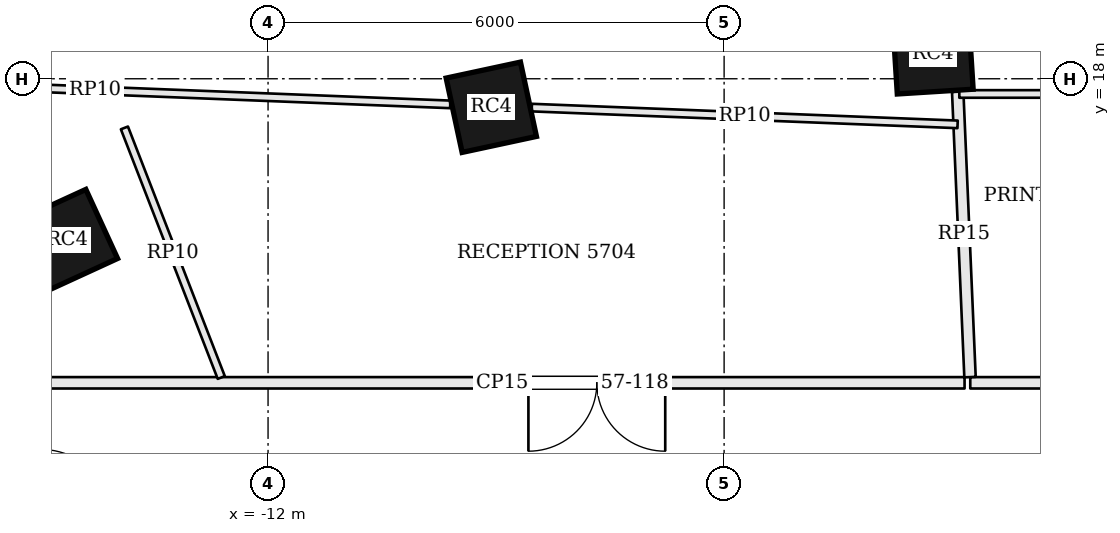
"""IFC4 building model, lengths in metres.
Left out: names, types, materials, properties, quantities, classifications, styles, units other than length and angle.
Written with IfcOpenShell. Run it as: python <this file> out.ifc"""

import sys

from ifc_helpers import new_model, si_unit, direction, frame, frame_2d, origin, origin_2d, place, context, subcontext, project, spatial, rectangle, extrude, element, fill, save


model = new_model("IFC4")
c1 = context("Model", 3, precision=1e-05, world=origin(), true_north=direction((0.0, 1.0)))
c2 = subcontext(c1, "Body", "Model", "MODEL_VIEW")
j1 = project(units=[si_unit("LENGTHUNIT", "METRE"), si_unit("PLANEANGLEUNIT", "RADIAN")], contexts=[c1])
p1 = place(None, origin())
s1 = spatial("IfcSite", under=j1, at=p1, CompositionType="ELEMENT")
p2 = place(p1, origin())
s2 = spatial("IfcBuilding", under=s1, at=p2, CompositionType="ELEMENT")
p3 = place(p2, frame((0.0, 0.0, 233.1)))
s3 = spatial("IfcBuildingStorey", under=s2, at=p3, CompositionType="ELEMENT", Elevation=233.1)
for number, where, z_axis, x_axis in (
    (1, (-3.254, 18.33, 0.0), (0.0, 0.0, 1.0), (-0.998, -0.063, 0.0)),
    (2, (-9.063, 17.625, 0.0), (0.0, 0.0, 1.0), (-0.978, -0.21, 0.0)),
    (3, (-14.643, 15.881, 0.0), (0.0, 0.0, 1.0), (-0.909, -0.417, 0.0)),
):
    element("IfcColumn", number, at=place(p3, frame(where, z_axis=z_axis, x_axis=x_axis)), inside=s3, PredefinedType="COLUMN", context=c2, shape_type="SweptSolid", body=[
        extrude(rectangle(XDim=1.0, YDim=1.0, at=origin_2d()), origin(), (0.0, 0.0, 1.0), 3.9),
    ])
p4 = place(p3, frame((14.925, 14.0, 0.0), z_axis=(0.0, 0.0, 1.0), x_axis=(-1.0, 0.0, 0.0)))
e4 = element("IfcWall", 4, at=p4, inside=s3, PredefinedType="PARTITIONING", context=c2, shape_type="SweptSolid", body=[
    extrude(rectangle(XDim=17.687, YDim=0.15, at=frame_2d((8.843, 0.0))), origin(), (0.0, 0.0, 1.0), 3.084),
])
p5 = place(p4, frame((0.45, 0.0, 0.0)))
e5 = element("IfcOpeningElement", 5, at=p5, cuts=e4, PredefinedType="OPENING", context=c2, shape_type="SweptSolid", body=[
    extrude(rectangle(XDim=1.0, YDim=2.4, at=frame_2d((0.5, 1.2))), frame((0.0, 0.085, 0.0), z_axis=(0.0, -1.0, 0.0), x_axis=(1.0, 0.0, 0.0)), (0.0, 0.0, 1.0), 0.17),
])
p6 = place(p4, frame((4.244, 0.0, 0.0)))
e6 = element("IfcOpeningElement", 6, at=p6, cuts=e4, PredefinedType="OPENING", context=c2, shape_type="SweptSolid", body=[
    extrude(rectangle(XDim=1.0, YDim=2.4, at=frame_2d((0.5, 1.2))), frame((0.0, 0.085, 0.0), z_axis=(0.0, -1.0, 0.0), x_axis=(1.0, 0.0, 0.0)), (0.0, 0.0, 1.0), 0.17),
])
p7 = place(p4, frame((8.57, 0.0, 0.0)))
e7 = element("IfcOpeningElement", 7, at=p7, cuts=e4, PredefinedType="OPENING", context=c2, shape_type="SweptSolid", body=[
    extrude(rectangle(XDim=1.0, YDim=2.4, at=frame_2d((0.5, 1.2))), frame((0.0, 0.085, 0.0), z_axis=(0.0, -1.0, 0.0), x_axis=(1.0, 0.0, 0.0)), (0.0, 0.0, 1.0), 0.17),
])
p8 = place(p4, frame((12.85, 0.0, 0.0)))
e8 = element("IfcOpeningElement", 8, at=p8, cuts=e4, PredefinedType="OPENING", context=c2, shape_type="SweptSolid", body=[
    extrude(rectangle(XDim=0.9, YDim=2.1, at=frame_2d((0.45, 1.05))), frame((0.0, 0.085, 0.0), z_axis=(0.0, -1.0, 0.0), x_axis=(1.0, 0.0, 0.0)), (0.0, 0.0, 1.0), 0.17),
])
p9 = place(p4, frame((15.65, 0.0, 0.0)))
e9 = element("IfcOpeningElement", 9, at=p9, cuts=e4, PredefinedType="OPENING", context=c2, shape_type="SweptSolid", body=[
    extrude(rectangle(XDim=0.9, YDim=2.1, at=frame_2d((0.45, 1.05))), frame((0.0, 0.085, 0.0), z_axis=(0.0, -1.0, 0.0), x_axis=(1.0, 0.0, 0.0)), (0.0, 0.0, 1.0), 0.17),
])
p10 = place(p3, frame((-2.927, 17.83, 0.0), z_axis=(0.0, 0.0, 1.0), x_axis=(0.043135572366, -0.99906922803, 0.0)))
e10 = element("IfcWall", 10, at=p10, inside=s3, PredefinedType="PARTITIONING", context=c2, shape_type="SweptSolid", body=[
    extrude(rectangle(XDim=3.758, YDim=0.15, at=frame_2d((1.879, 0.0))), origin(), (0.0, 0.0, 1.0), 3.084),
])
p11 = place(p3, frame((-2.837, 14.0, 0.0), z_axis=(0.0, 0.0, 1.0), x_axis=(-1.0, 0.0, 0.0)))
e11 = element("IfcWall", 11, at=p11, inside=s3, PredefinedType="PARTITIONING", context=c2, shape_type="SweptSolid", body=[
    extrude(rectangle(XDim=12.163, YDim=0.15, at=frame_2d((6.082, 0.0))), origin(), (0.0, 0.0, 1.0), 3.084),
])
p12 = place(p11, frame((3.938, 0.0, 0.0)))
e12 = element("IfcOpeningElement", 12, at=p12, cuts=e11, PredefinedType="OPENING", context=c2, shape_type="SweptSolid", body=[
    extrude(rectangle(XDim=1.8, YDim=2.1, at=frame_2d((0.9, 1.05))), frame((0.0, 0.085, 0.0), z_axis=(0.0, -1.0, 0.0), x_axis=(1.0, 0.0, 0.0)), (0.0, 0.0, 1.0), 0.17),
])
p13 = place(p3, frame((-2.906, 17.8, 0.0), z_axis=(0.0, 0.0, 1.0), x_axis=(1.0, 0.0, 0.0)))
e13 = element("IfcWall", 13, at=p13, inside=s3, PredefinedType="PARTITIONING", context=c2, shape_type="SweptSolid", body=[
    extrude(rectangle(XDim=10.808, YDim=0.1, at=frame_2d((5.404, 0.0))), origin(), (0.0, 0.0, 1.0), 3.084),
])
p14 = place(p13, frame((3.7, 0.0, 0.0)))
e14 = element("IfcOpeningElement", 14, at=p14, cuts=e13, PredefinedType="OPENING", context=c2, shape_type="SweptSolid", body=[
    extrude(rectangle(XDim=0.9, YDim=2.1, at=frame_2d((0.45, 1.05))), frame((0.0, 0.06, 0.0), z_axis=(0.0, -1.0, 0.0), x_axis=(1.0, 0.0, 0.0)), (0.0, 0.0, 1.0), 0.12),
])
p15 = place(p13, frame((1.502, 0.0, 0.0)))
e15 = element("IfcOpeningElement", 15, at=p15, cuts=e13, PredefinedType="OPENING", context=c2, shape_type="SweptSolid", body=[
    extrude(rectangle(XDim=0.9, YDim=2.1, at=frame_2d((0.45, 1.05))), frame((0.0, 0.06, 0.0), z_axis=(0.0, -1.0, 0.0), x_axis=(1.0, 0.0, 0.0)), (0.0, 0.0, 1.0), 0.12),
])
p16 = place(p3, frame((-18.946, 18.031, 0.0), z_axis=(0.0, 0.0, 1.0), x_axis=(0.999224475149, -0.039375731905, 0.0)))
e16 = element("IfcWall", 16, at=p16, inside=s3, PredefinedType="PARTITIONING", context=c2, shape_type="SweptSolid", body=[
    extrude(rectangle(XDim=9.35, YDim=0.1, at=frame_2d((4.675, 0.0))), origin(), (0.0, 0.0, 1.0), 3.084),
])
p17 = place(p3, frame((-8.53, 17.621, 0.0), z_axis=(0.0, 0.0, 1.0), x_axis=(0.999224779049, -0.039368019188, 0.0)))
e17 = element("IfcWall", 17, at=p17, inside=s3, PredefinedType="PARTITIONING", context=c2, shape_type="SweptSolid", body=[
    extrude(rectangle(XDim=5.606, YDim=0.1, at=frame_2d((2.803, 0.0))), origin(), (0.0, 0.0, 1.0), 3.084),
])
p18 = place(p3, frame((-12.615, 14.07, 0.0), z_axis=(0.0, 0.0, 1.0), x_axis=(-0.361750417315, 0.932274978519, 0.0)))
e18 = element("IfcWall", 18, at=p18, inside=s3, PredefinedType="PARTITIONING", context=c2, shape_type="SweptSolid", body=[
    extrude(rectangle(XDim=3.522, YDim=0.1, at=frame_2d((1.761, 0.0))), origin(), (0.0, 0.0, 1.0), 3.084),
])
p19 = place(p12, origin())
e19 = element("IfcDoor", 19, at=p19, inside=s3, OperationType="DOUBLE_DOOR_SINGLE_SWING", PredefinedType="DOOR", context=c2, shape_type="SweptSolid", body=[
    extrude(rectangle(XDim=1.8, YDim=2.1, at=frame_2d((0.9, 1.05))), frame((0.0, 0.025, 0.0), z_axis=(0.0, -1.0, 0.0), x_axis=(1.0, 0.0, 0.0)), (0.0, 0.0, 1.0), 0.05),
])
fill(e12, e19)
save(model, sys.argv[1])
